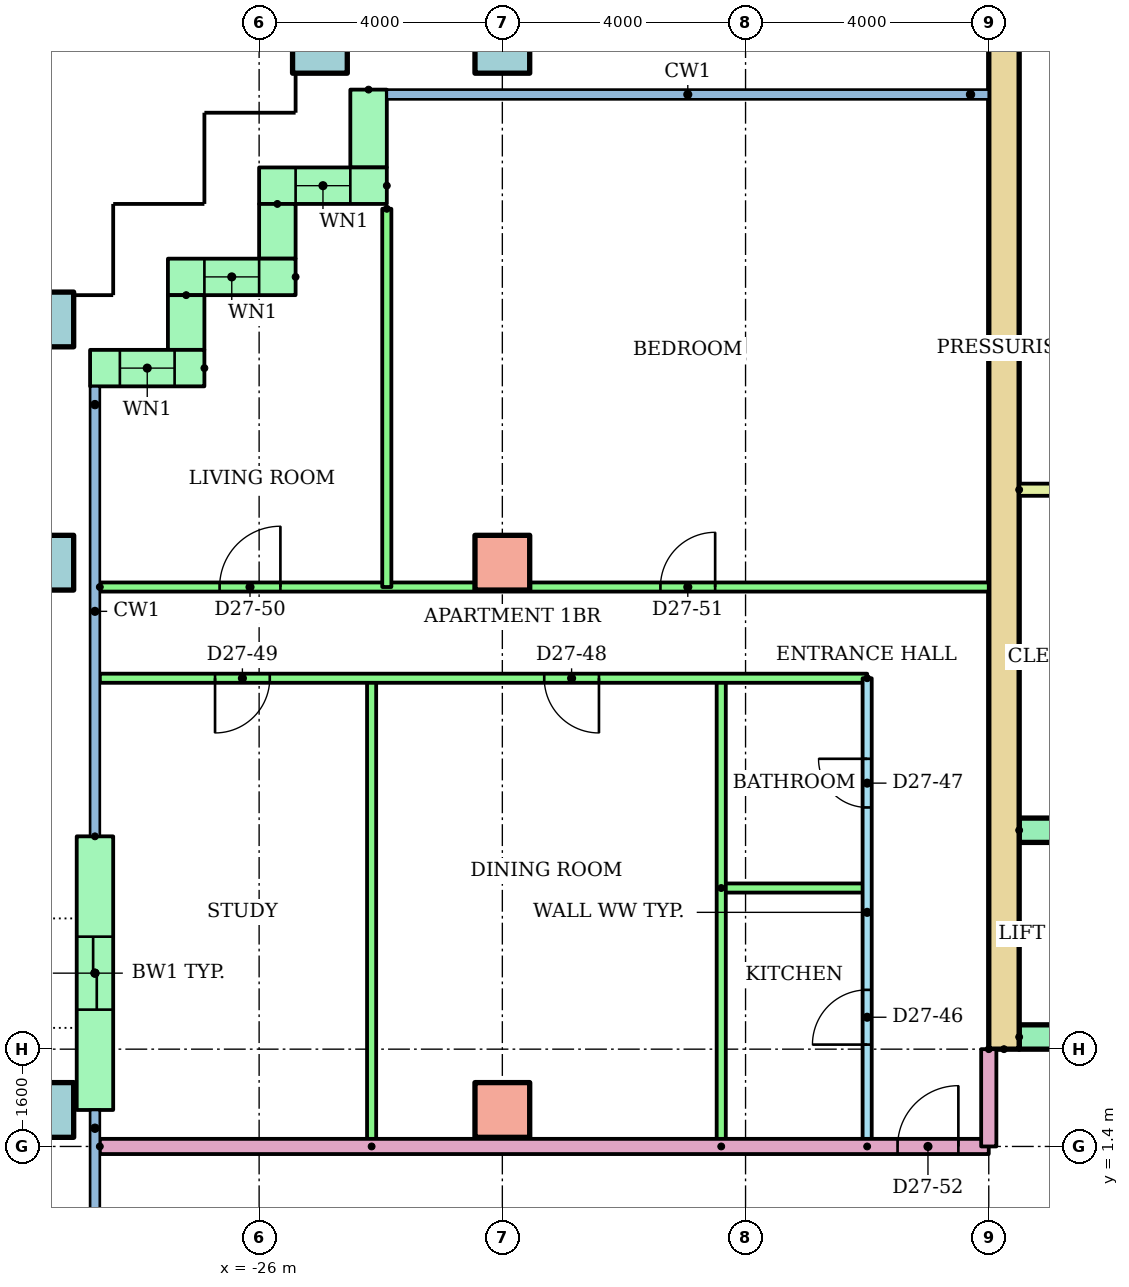
"""IFC4 building model, lengths in metres.
Left out: names, types, materials, properties, quantities, classifications, styles, units other than length and angle.
Written with IfcOpenShell. Run it as: python <this file> out.ifc"""

import sys

from ifc_helpers import new_model, si_unit, direction, frame, frame_2d, origin, origin_2d, place, context, subcontext, project, spatial, rectangle, hollow_rectangle, extrude, element, fill, save


model = new_model("IFC4")
c1 = context("Model", 3, precision=1e-05, world=origin(), true_north=direction((0.0, 1.0)))
c2 = subcontext(c1, "Body", "Model", "MODEL_VIEW")
j1 = project(units=[si_unit("LENGTHUNIT", "METRE"), si_unit("PLANEANGLEUNIT", "RADIAN")], contexts=[c1])
p1 = place(None, origin())
s1 = spatial("IfcSite", under=j1, at=p1, CompositionType="ELEMENT")
p2 = place(p1, origin())
s2 = spatial("IfcBuilding", under=s1, at=p2, CompositionType="ELEMENT")
p3 = place(p2, frame((0.0, 0.0, 103.1)))
s3 = spatial("IfcBuildingStorey", under=s2, at=p3, CompositionType="ELEMENT", Elevation=103.1)
p4 = place(p3, frame((-29.5, 2.0, 0.0)))
e1 = element("IfcColumn", 1, at=p4, inside=s3, PredefinedType="COLUMN", context=c2, shape_type="SweptSolid", body=[
    extrude(hollow_rectangle(XDim=0.9, YDim=0.9, WallThickness=0.045, at=origin_2d()), origin(), (0.0, 0.0, 1.0), 3.2),
])
p5 = place(p3, frame((-22.0, 2.0, 0.0)))
e2 = element("IfcColumn", 2, at=p5, inside=s3, PredefinedType="COLUMN", context=c2, shape_type="SweptSolid", body=[
    extrude(rectangle(XDim=0.9, YDim=0.9, at=origin_2d()), origin(), (0.0, 0.0, 1.0), 3.2),
])
p6 = place(p3, frame((-29.5, 11.0, 0.0)))
e3 = element("IfcColumn", 3, at=p6, inside=s3, PredefinedType="COLUMN", context=c2, shape_type="SweptSolid", body=[
    extrude(hollow_rectangle(XDim=0.9, YDim=0.9, WallThickness=0.045, at=origin_2d()), origin(), (0.0, 0.0, 1.0), 3.2),
])
p7 = place(p3, frame((-22.0, 11.0, 0.0)))
e4 = element("IfcColumn", 4, at=p7, inside=s3, PredefinedType="COLUMN", context=c2, shape_type="SweptSolid", body=[
    extrude(rectangle(XDim=0.9, YDim=0.9, at=origin_2d()), origin(), (0.0, 0.0, 1.0), 3.2),
])
for number, where in (
    (5, (-29.5, 15.0, 0.0)),
    (6, (-25.0, 19.5, 0.0)),
    (7, (-22.0, 19.5, 0.0)),
):
    element("IfcColumn", number, at=place(p3, frame(where)), inside=s3, PredefinedType="COLUMN", context=c2, shape_type="SweptSolid", body=[
        extrude(hollow_rectangle(XDim=0.9, YDim=0.9, WallThickness=0.045, at=origin_2d()), origin(), (0.0, 0.0, 1.0), 3.2),
    ])
p8 = place(p3, frame((-24.2, 18.78, 0.0), z_axis=(0.0, 0.0, 1.0), x_axis=(0.0, -1.0, 0.0)))
e8 = element("IfcWall", 8, at=p8, inside=s3, PredefinedType="STANDARD", context=c2, shape_type="SweptSolid", body=[
    extrude(rectangle(XDim=1.28, YDim=0.6, at=frame_2d((0.64, 0.0))), origin(), (0.0, 0.0, 1.0), 2.8),
])
p9 = place(p3, frame((-23.9, 17.2, 0.0), z_axis=(0.0, 0.0, 1.0), x_axis=(-1.0, 0.0, 0.0)))
e9 = element("IfcWall", 9, at=p9, inside=s3, PredefinedType="STANDARD", context=c2, shape_type="SweptSolid", body=[
    extrude(rectangle(XDim=2.1, YDim=0.6, at=frame_2d((1.05, 0.0))), origin(), (0.0, 0.0, 1.0), 2.8),
])
p10 = place(p9, frame((0.6, 0.0, 0.9)))
e10 = element("IfcOpeningElement", 10, at=p10, cuts=e9, PredefinedType="OPENING", context=c2, shape_type="SweptSolid", body=[
    extrude(rectangle(XDim=0.9, YDim=1.5, at=frame_2d((0.45, 0.75))), frame((0.0, 0.31, 0.0), z_axis=(0.0, -1.0, 0.0), x_axis=(1.0, 0.0, 0.0)), (0.0, 0.0, 1.0), 0.62),
])
p11 = place(p3, frame((-25.7, 16.9, 0.0), z_axis=(0.0, 0.0, 1.0), x_axis=(0.0, -1.0, 0.0)))
e11 = element("IfcWall", 11, at=p11, inside=s3, PredefinedType="STANDARD", context=c2, shape_type="SweptSolid", body=[
    extrude(rectangle(XDim=0.9, YDim=0.6, at=frame_2d((0.45, 0.0))), origin(), (0.0, 0.0, 1.0), 2.8),
])
p12 = place(p3, frame((-25.4, 15.7, 0.0), z_axis=(0.0, 0.0, 1.0), x_axis=(-1.0, 0.0, 0.0)))
e12 = element("IfcWall", 12, at=p12, inside=s3, PredefinedType="STANDARD", context=c2, shape_type="SweptSolid", body=[
    extrude(rectangle(XDim=2.1, YDim=0.6, at=frame_2d((1.05, 0.0))), origin(), (0.0, 0.0, 1.0), 2.8),
])
p13 = place(p12, frame((0.6, 0.0, 0.9)))
e13 = element("IfcOpeningElement", 13, at=p13, cuts=e12, PredefinedType="OPENING", context=c2, shape_type="SweptSolid", body=[
    extrude(rectangle(XDim=0.9, YDim=1.5, at=frame_2d((0.45, 0.75))), frame((0.0, 0.31, 0.0), z_axis=(0.0, -1.0, 0.0), x_axis=(1.0, 0.0, 0.0)), (0.0, 0.0, 1.0), 0.62),
])
p14 = place(p3, frame((-27.2, 15.4, 0.0), z_axis=(0.0, 0.0, 1.0), x_axis=(0.0, -1.0, 0.0)))
e14 = element("IfcWall", 14, at=p14, inside=s3, PredefinedType="STANDARD", context=c2, shape_type="SweptSolid", body=[
    extrude(rectangle(XDim=0.9, YDim=0.6, at=frame_2d((0.45, 0.0))), origin(), (0.0, 0.0, 1.0), 2.8),
])
p15 = place(p3, frame((-26.9, 14.2, 0.0), z_axis=(0.0, 0.0, 1.0), x_axis=(-1.0, 0.0, 0.0)))
e15 = element("IfcWall", 15, at=p15, inside=s3, PredefinedType="STANDARD", context=c2, shape_type="SweptSolid", body=[
    extrude(rectangle(XDim=1.88, YDim=0.6, at=frame_2d((0.94, 0.0))), origin(), (0.0, 0.0, 1.0), 2.8),
])
p16 = place(p15, frame((0.49, 0.0, 0.9)))
e16 = element("IfcOpeningElement", 16, at=p16, cuts=e15, PredefinedType="OPENING", context=c2, shape_type="SweptSolid", body=[
    extrude(rectangle(XDim=0.9, YDim=1.5, at=frame_2d((0.45, 0.75))), frame((0.0, 0.31, 0.0), z_axis=(0.0, -1.0, 0.0), x_axis=(1.0, 0.0, 0.0)), (0.0, 0.0, 1.0), 0.62),
])
p17 = place(p3, frame((-28.7, 6.5, 0.0), z_axis=(0.0, 0.0, 1.0), x_axis=(0.0, -1.0, 0.0)))
e17 = element("IfcWall", 17, at=p17, inside=s3, PredefinedType="STANDARD", context=c2, shape_type="SweptSolid", body=[
    extrude(rectangle(XDim=4.5, YDim=0.6, at=frame_2d((2.25, 0.0))), origin(), (0.0, 0.0, 1.0), 2.8),
])
p18 = place(p17, frame((1.65, 0.0, 0.0)))
e18 = element("IfcOpeningElement", 18, at=p18, cuts=e17, PredefinedType="OPENING", context=c2, shape_type="SweptSolid", body=[
    extrude(rectangle(XDim=1.2, YDim=2.1, at=frame_2d((0.6, 1.05))), frame((0.0, 0.31, 0.0), z_axis=(0.0, -1.0, 0.0), x_axis=(1.0, 0.0, 0.0)), (0.0, 0.0, 1.0), 0.62),
])
p19 = place(p3, frame((-13.75, 3.0, 0.0), z_axis=(0.0, 0.0, 1.0), x_axis=(0.0, 1.0, 0.0)))
e19 = element("IfcWall", 19, at=p19, inside=s3, PredefinedType="SHEAR", context=c2, shape_type="SweptSolid", body=[
    extrude(rectangle(XDim=17.0, YDim=0.5, at=frame_2d((8.5, 0.0))), origin(), (0.0, 0.0, 1.0), 2.8),
])
p20 = place(p3, frame((-13.5, 3.2, 0.0)))
e20 = element("IfcWall", 20, at=p20, inside=s3, PredefinedType="SHEAR", context=c2, shape_type="SweptSolid", body=[
    extrude(rectangle(XDim=27.0, YDim=0.4, at=frame_2d((13.5, 0.0))), origin(), (0.0, 0.0, 1.0), 2.8),
])
p21 = place(p20, frame((6.861, 0.0, 0.0)))
e21 = element("IfcOpeningElement", 21, at=p21, cuts=e20, PredefinedType="OPENING", context=c2, shape_type="SweptSolid", body=[
    extrude(rectangle(XDim=1.1, YDim=2.1, at=frame_2d((0.55, 1.05))), frame((0.0, 0.21, 0.0), z_axis=(0.0, -1.0, 0.0), x_axis=(1.0, 0.0, 0.0)), (0.0, 0.0, 1.0), 0.42),
])
p22 = place(p20, frame((9.906, 0.0, 0.0)))
e22 = element("IfcOpeningElement", 22, at=p22, cuts=e20, PredefinedType="OPENING", context=c2, shape_type="SweptSolid", body=[
    extrude(rectangle(XDim=1.1, YDim=2.1, at=frame_2d((0.55, 1.05))), frame((0.0, 0.21, 0.0), z_axis=(0.0, -1.0, 0.0), x_axis=(1.0, 0.0, 0.0)), (0.0, 0.0, 1.0), 0.42),
])
p23 = place(p20, frame((15.994, 0.0, 0.0)))
e23 = element("IfcOpeningElement", 23, at=p23, cuts=e20, PredefinedType="OPENING", context=c2, shape_type="SweptSolid", body=[
    extrude(rectangle(XDim=1.1, YDim=2.1, at=frame_2d((0.55, 1.05))), frame((0.0, 0.21, 0.0), z_axis=(0.0, -1.0, 0.0), x_axis=(1.0, 0.0, 0.0)), (0.0, 0.0, 1.0), 0.42),
])
p24 = place(p20, frame((19.039, 0.0, 0.0)))
e24 = element("IfcOpeningElement", 24, at=p24, cuts=e20, PredefinedType="OPENING", context=c2, shape_type="SweptSolid", body=[
    extrude(rectangle(XDim=1.1, YDim=2.1, at=frame_2d((0.55, 1.05))), frame((0.0, 0.21, 0.0), z_axis=(0.0, -1.0, 0.0), x_axis=(1.0, 0.0, 0.0)), (0.0, 0.0, 1.0), 0.42),
])
p25 = place(p20, frame((12.6, 0.0, 0.0)))
e25 = element("IfcOpeningElement", 25, at=p25, cuts=e20, PredefinedType="OPENING", context=c2, shape_type="SweptSolid", body=[
    extrude(rectangle(XDim=1.8, YDim=2.1, at=frame_2d((0.9, 1.05))), frame((0.0, 0.21, 0.0), z_axis=(0.0, -1.0, 0.0), x_axis=(1.0, 0.0, 0.0)), (0.0, 0.0, 1.0), 0.42),
])
p26 = place(p3, frame((-13.5, 6.6, 0.0)))
e26 = element("IfcWall", 26, at=p26, inside=s3, PredefinedType="SHEAR", context=c2, shape_type="SweptSolid", body=[
    extrude(rectangle(XDim=11.978, YDim=0.4, at=frame_2d((5.989, 0.0))), origin(), (0.0, 0.0, 1.0), 2.8),
])
p27 = place(p3, frame((-13.5, 12.2, 0.0)))
e27 = element("IfcWall", 27, at=p27, inside=s3, PredefinedType="PARTITIONING", context=c2, shape_type="SweptSolid", body=[
    extrude(rectangle(XDim=3.9, YDim=0.2, at=frame_2d((1.95, 0.0))), origin(), (0.0, 0.0, 1.0), 2.8),
])
p28 = place(p3, frame((-16.0, 1.4, 0.0), z_axis=(0.0, 0.0, 1.0), x_axis=(0.0, 1.0, 0.0)))
e28 = element("IfcWall", 28, at=p28, inside=s3, PredefinedType="PARTITIONING", context=c2, shape_type="SweptSolid", body=[
    extrude(rectangle(XDim=7.7, YDim=0.15, at=frame_2d((3.85, 0.0))), origin(), (0.0, 0.0, 1.0), 2.4),
])
p29 = place(p28, frame((1.675, 0.0, 0.0)))
e29 = element("IfcOpeningElement", 29, at=p29, cuts=e28, PredefinedType="OPENING", context=c2, shape_type="SweptSolid", body=[
    extrude(rectangle(XDim=0.9, YDim=2.1, at=frame_2d((0.45, 1.05))), frame((0.0, 0.085, 0.0), z_axis=(0.0, -1.0, 0.0), x_axis=(1.0, 0.0, 0.0)), (0.0, 0.0, 1.0), 0.17),
])
p30 = place(p28, frame((5.575, 0.0, 0.0)))
e30 = element("IfcOpeningElement", 30, at=p30, cuts=e28, PredefinedType="OPENING", context=c2, shape_type="SweptSolid", body=[
    extrude(rectangle(XDim=0.8, YDim=2.1, at=frame_2d((0.4, 1.05))), frame((0.0, 0.085, 0.0), z_axis=(0.0, -1.0, 0.0), x_axis=(1.0, 0.0, 0.0)), (0.0, 0.0, 1.0), 0.17),
])
p31 = place(p3, frame((-18.4, 5.65, 0.0)))
e31 = element("IfcWall", 31, at=p31, inside=s3, PredefinedType="PARTITIONING", context=c2, shape_type="SweptSolid", body=[
    extrude(rectangle(XDim=2.4, YDim=0.15, at=frame_2d((1.2, 0.0))), origin(), (0.0, 0.0, 1.0), 2.4),
])
for number, where, z_axis, x_axis in (
    (32, (-18.4, 1.4, 0.0), (0.0, 0.0, 1.0), (0.0, 1.0, 0.0)),
    (33, (-24.15, 1.4, 0.0), (0.0, 0.0, 1.0), (0.0, 1.0, 0.0)),
):
    element("IfcWall", number, at=place(p3, frame(where, z_axis=z_axis, x_axis=x_axis)), inside=s3, PredefinedType="PARTITIONING", context=c2, shape_type="SweptSolid", body=[
        extrude(rectangle(XDim=7.7, YDim=0.15, at=frame_2d((3.85, 0.0))), origin(), (0.0, 0.0, 1.0), 2.4),
    ])
p32 = place(p3, frame((-16.0, 9.1, 0.0), z_axis=(0.0, 0.0, 1.0), x_axis=(-1.0, 0.0, 0.0)))
e34 = element("IfcWall", 34, at=p32, inside=s3, PredefinedType="PARTITIONING", context=c2, shape_type="SweptSolid", body=[
    extrude(rectangle(XDim=12.62, YDim=0.15, at=frame_2d((6.31, 0.0))), origin(), (0.0, 0.0, 1.0), 2.4),
])
p33 = place(p32, frame((4.411, 0.0, 0.0)))
e35 = element("IfcOpeningElement", 35, at=p33, cuts=e34, PredefinedType="OPENING", context=c2, shape_type="SweptSolid", body=[
    extrude(rectangle(XDim=0.9, YDim=2.1, at=frame_2d((0.45, 1.05))), frame((0.0, 0.085, 0.0), z_axis=(0.0, -1.0, 0.0), x_axis=(1.0, 0.0, 0.0)), (0.0, 0.0, 1.0), 0.17),
])
p34 = place(p32, frame((9.825, 0.0, 0.0)))
e36 = element("IfcOpeningElement", 36, at=p34, cuts=e34, PredefinedType="OPENING", context=c2, shape_type="SweptSolid", body=[
    extrude(rectangle(XDim=0.9, YDim=2.1, at=frame_2d((0.45, 1.05))), frame((0.0, 0.085, 0.0), z_axis=(0.0, -1.0, 0.0), x_axis=(1.0, 0.0, 0.0)), (0.0, 0.0, 1.0), 0.17),
])
p35 = place(p3, frame((-28.62, 10.6, 0.0)))
e37 = element("IfcWall", 37, at=p35, inside=s3, PredefinedType="PARTITIONING", context=c2, shape_type="SweptSolid", body=[
    extrude(rectangle(XDim=14.62, YDim=0.15, at=frame_2d((7.31, 0.0))), origin(), (0.0, 0.0, 1.0), 2.4),
])
p36 = place(p35, frame((1.97, 0.0, 0.0)))
e38 = element("IfcOpeningElement", 38, at=p36, cuts=e37, PredefinedType="OPENING", context=c2, shape_type="SweptSolid", body=[
    extrude(rectangle(XDim=1.0, YDim=2.1, at=frame_2d((0.5, 1.05))), frame((0.0, 0.085, 0.0), z_axis=(0.0, -1.0, 0.0), x_axis=(1.0, 0.0, 0.0)), (0.0, 0.0, 1.0), 0.17),
])
p37 = place(p35, frame((9.22, 0.0, 0.0)))
e39 = element("IfcOpeningElement", 39, at=p37, cuts=e37, PredefinedType="OPENING", context=c2, shape_type="SweptSolid", body=[
    extrude(rectangle(XDim=0.9, YDim=2.1, at=frame_2d((0.45, 1.05))), frame((0.0, 0.085, 0.0), z_axis=(0.0, -1.0, 0.0), x_axis=(1.0, 0.0, 0.0)), (0.0, 0.0, 1.0), 0.17),
])
p38 = place(p3, frame((-23.9, 16.82, 0.0), z_axis=(0.0, 0.0, 1.0), x_axis=(0.0, -1.0, 0.0)))
e40 = element("IfcWall", 40, at=p38, inside=s3, PredefinedType="PARTITIONING", context=c2, shape_type="SweptSolid", body=[
    extrude(rectangle(XDim=6.22, YDim=0.15, at=frame_2d((3.11, 0.0))), origin(), (0.0, 0.0, 1.0), 2.4),
])
p39 = place(p3, frame((-28.62, 1.4, 0.0)))
e41 = element("IfcWall", 41, at=p39, inside=s3, PredefinedType="PARTITIONING", context=c2, shape_type="SweptSolid", body=[
    extrude(rectangle(XDim=14.62, YDim=0.25, at=frame_2d((7.31, 0.0))), origin(), (0.0, 0.0, 1.0), 2.4),
])
p40 = place(p39, frame((13.12, 0.0, 0.0)))
e42 = element("IfcOpeningElement", 42, at=p40, cuts=e41, PredefinedType="OPENING", context=c2, shape_type="SweptSolid", body=[
    extrude(rectangle(XDim=1.0, YDim=2.1, at=frame_2d((0.5, 1.05))), frame((0.0, 0.135, 0.0), z_axis=(0.0, -1.0, 0.0), x_axis=(1.0, 0.0, 0.0)), (0.0, 0.0, 1.0), 0.27),
])
p41 = place(p3, frame((-14.0, 3.0, 0.0), z_axis=(0.0, 0.0, 1.0), x_axis=(0.0, -1.0, 0.0)))
e43 = element("IfcWall", 43, at=p41, inside=s3, PredefinedType="PARTITIONING", context=c2, shape_type="SweptSolid", body=[
    extrude(rectangle(XDim=1.6, YDim=0.25, at=frame_2d((0.8, 0.0))), origin(), (0.0, 0.0, 1.0), 2.4),
])
p42 = place(p10, origin())
e44 = element("IfcWindow", 44, at=p42, inside=s3, PartitioningType="SINGLE_PANEL", PredefinedType="WINDOW", context=c2, shape_type="SweptSolid", body=[
    extrude(rectangle(XDim=0.9, YDim=1.5, at=frame_2d((0.45, 0.75))), frame((0.0, 0.03, 0.0), z_axis=(0.0, -1.0, 0.0), x_axis=(1.0, 0.0, 0.0)), (0.0, 0.0, 1.0), 0.06),
])
fill(e10, e44)
p43 = place(p13, origin())
e45 = element("IfcWindow", 45, at=p43, inside=s3, PartitioningType="SINGLE_PANEL", PredefinedType="WINDOW", context=c2, shape_type="SweptSolid", body=[
    extrude(rectangle(XDim=0.9, YDim=1.5, at=frame_2d((0.45, 0.75))), frame((0.0, 0.03, 0.0), z_axis=(0.0, -1.0, 0.0), x_axis=(1.0, 0.0, 0.0)), (0.0, 0.0, 1.0), 0.06),
])
fill(e13, e45)
p44 = place(p16, origin())
e46 = element("IfcWindow", 46, at=p44, inside=s3, PartitioningType="SINGLE_PANEL", PredefinedType="WINDOW", context=c2, shape_type="SweptSolid", body=[
    extrude(rectangle(XDim=0.9, YDim=1.5, at=frame_2d((0.45, 0.75))), frame((0.0, 0.03, 0.0), z_axis=(0.0, -1.0, 0.0), x_axis=(1.0, 0.0, 0.0)), (0.0, 0.0, 1.0), 0.06),
])
fill(e16, e46)
p45 = place(p29, origin())
e47 = element("IfcDoor", 47, at=p45, inside=s3, OperationType="SINGLE_SWING_LEFT", PredefinedType="DOOR", context=c2, shape_type="SweptSolid", body=[
    extrude(rectangle(XDim=0.9, YDim=2.1, at=frame_2d((0.45, 1.05))), frame((0.0, 0.025, 0.0), z_axis=(0.0, -1.0, 0.0), x_axis=(1.0, 0.0, 0.0)), (0.0, 0.0, 1.0), 0.05),
])
fill(e29, e47)
p46 = place(p30, origin())
e48 = element("IfcDoor", 48, at=p46, inside=s3, OperationType="SINGLE_SWING_RIGHT", PredefinedType="DOOR", context=c2, shape_type="SweptSolid", body=[
    extrude(rectangle(XDim=0.8, YDim=2.1, at=frame_2d((0.4, 1.05))), frame((0.0, 0.025, 0.0), z_axis=(0.0, -1.0, 0.0), x_axis=(1.0, 0.0, 0.0)), (0.0, 0.0, 1.0), 0.05),
])
fill(e30, e48)
p47 = place(p33, origin())
e49 = element("IfcDoor", 49, at=p47, inside=s3, OperationType="SINGLE_SWING_LEFT", PredefinedType="DOOR", context=c2, shape_type="SweptSolid", body=[
    extrude(rectangle(XDim=0.9, YDim=2.1, at=frame_2d((0.45, 1.05))), frame((0.0, 0.025, 0.0), z_axis=(0.0, -1.0, 0.0), x_axis=(1.0, 0.0, 0.0)), (0.0, 0.0, 1.0), 0.05),
])
fill(e35, e49)
p48 = place(p34, origin())
e50 = element("IfcDoor", 50, at=p48, inside=s3, OperationType="SINGLE_SWING_RIGHT", PredefinedType="DOOR", context=c2, shape_type="SweptSolid", body=[
    extrude(rectangle(XDim=0.9, YDim=2.1, at=frame_2d((0.45, 1.05))), frame((0.0, 0.025, 0.0), z_axis=(0.0, -1.0, 0.0), x_axis=(1.0, 0.0, 0.0)), (0.0, 0.0, 1.0), 0.05),
])
fill(e36, e50)
p49 = place(p36, origin())
e51 = element("IfcDoor", 51, at=p49, inside=s3, OperationType="SINGLE_SWING_RIGHT", PredefinedType="DOOR", context=c2, shape_type="SweptSolid", body=[
    extrude(rectangle(XDim=1.0, YDim=2.1, at=frame_2d((0.5, 1.05))), frame((0.0, 0.025, 0.0), z_axis=(0.0, -1.0, 0.0), x_axis=(1.0, 0.0, 0.0)), (0.0, 0.0, 1.0), 0.05),
])
fill(e38, e51)
p50 = place(p37, origin())
e52 = element("IfcDoor", 52, at=p50, inside=s3, OperationType="SINGLE_SWING_RIGHT", PredefinedType="DOOR", context=c2, shape_type="SweptSolid", body=[
    extrude(rectangle(XDim=0.9, YDim=2.1, at=frame_2d((0.45, 1.05))), frame((0.0, 0.025, 0.0), z_axis=(0.0, -1.0, 0.0), x_axis=(1.0, 0.0, 0.0)), (0.0, 0.0, 1.0), 0.05),
])
fill(e39, e52)
p51 = place(p40, origin())
e53 = element("IfcDoor", 53, at=p51, inside=s3, OperationType="SINGLE_SWING_RIGHT", PredefinedType="DOOR", context=c2, shape_type="SweptSolid", body=[
    extrude(rectangle(XDim=1.0, YDim=2.1, at=frame_2d((0.5, 1.05))), frame((0.0, 0.025, 0.0), z_axis=(0.0, -1.0, 0.0), x_axis=(1.0, 0.0, 0.0)), (0.0, 0.0, 1.0), 0.05),
])
fill(e42, e53)
p52 = place(p18, origin())
e54 = element("IfcDoor", 54, at=p52, inside=s3, OperationType="SLIDING_TO_LEFT", PredefinedType="DOOR", context=c2, shape_type="SweptSolid", body=[
    extrude(rectangle(XDim=1.2, YDim=2.1, at=frame_2d((0.6, 1.05))), frame((0.0, 0.025, 0.0), z_axis=(0.0, -1.0, 0.0), x_axis=(1.0, 0.0, 0.0)), (0.0, 0.0, 1.0), 0.05),
])
fill(e18, e54)
save(model, sys.argv[1])
